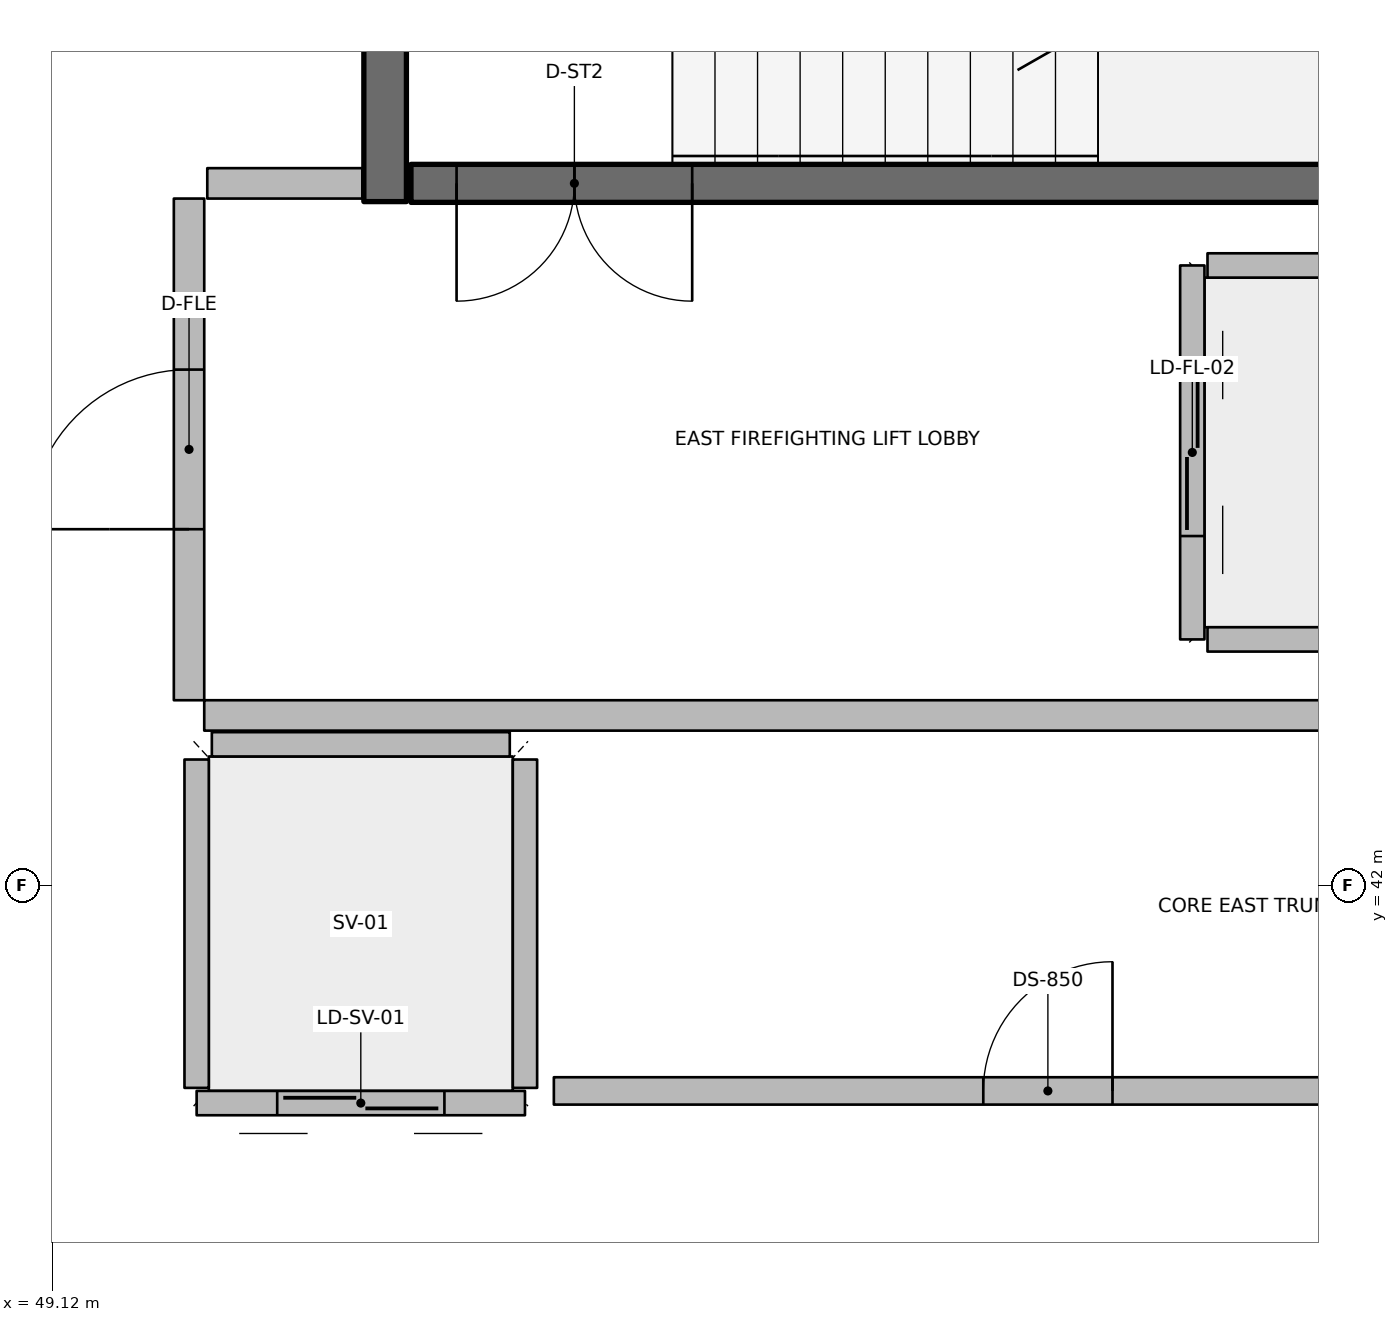
"""IFC4 building model, lengths in metres.
Left out: names, types, materials, properties, quantities, classifications, styles, units other than length and angle.
Written with IfcOpenShell. Run it as: python <this file> out.ifc"""

import sys

from ifc_helpers import new_model, si_unit, direction, frame, frame_2d, origin, origin_2d, place, context, subcontext, project, spatial, rectangle, hollow_rectangle, extrude, element, fill, save


model = new_model("IFC4")
c1 = context("Model", 3, precision=1e-05, world=origin(), true_north=direction((0.0, 1.0)))
c2 = subcontext(c1, "Body", "Model", "MODEL_VIEW")
j1 = project(units=[si_unit("LENGTHUNIT", "METRE"), si_unit("PLANEANGLEUNIT", "RADIAN")], contexts=[c1])
p1 = place(None, origin())
s1 = spatial("IfcSite", under=j1, at=p1, CompositionType="ELEMENT")
p2 = place(p1, origin())
s2 = spatial("IfcBuilding", under=s1, at=p2, CompositionType="ELEMENT")
p3 = place(p2, frame((0.0, 0.0, 26.4)))
s3 = spatial("IfcBuildingStorey", under=s2, at=p3, CompositionType="ELEMENT", Elevation=26.4)
p4 = place(p3, frame((51.31, 46.5, 0.0), z_axis=(0.0, 0.0, 1.0), x_axis=(0.0, 1.0, 0.0)))
e1 = element("IfcWall", 1, at=p4, inside=s3, PredefinedType="SHEAR", context=c2, shape_type="SweptSolid", body=[
    extrude(rectangle(XDim=3.5, YDim=0.28, at=frame_2d((1.75, 0.0))), origin(), (0.0, 0.0, 1.0), 3.75),
])
p5 = place(p3, frame((56.0, 46.62, 0.0), z_axis=(0.0, 0.0, 1.0), x_axis=(1.0, 0.0, 0.0)))
e2 = element("IfcColumn", 2, at=p5, inside=s3, PredefinedType="COLUMN", context=c2, shape_type="SweptSolid", body=[
    extrude(hollow_rectangle(XDim=0.2, YDim=0.2, WallThickness=0.01, InnerFilletRadius=0.01, OuterFilletRadius=0.02, at=origin_2d()), origin(), (0.0, 0.0, 1.0), 1.67),
])
p6 = place(p3, frame((51.48, 46.62, 0.0), z_axis=(0.0, 0.0, 1.0), x_axis=(1.0, 0.0, 0.0)))
e3 = element("IfcWall", 3, at=p6, inside=s3, PredefinedType="SOLIDWALL", context=c2, shape_type="SweptSolid", body=[
    extrude(rectangle(XDim=7.54, YDim=0.25, at=frame_2d((3.77, 0.0))), origin(), (0.0, 0.0, 1.0), 3.5),
])
p7 = place(p6, frame((0.3, 0.0, 0.0)))
e4 = element("IfcOpeningElement", 4, at=p7, cuts=e3, PredefinedType="OPENING", context=c2, shape_type="SweptSolid", body=[
    extrude(rectangle(XDim=1.55, YDim=2.15, at=frame_2d((0.775, 1.075))), frame((0.0, 0.135, 0.0), z_axis=(0.0, -1.0, 0.0), x_axis=(1.0, 0.0, 0.0)), (0.0, 0.0, 1.0), 0.27),
])
p8 = place(p3, frame((56.62, 46.08, 0.0), z_axis=(0.0, 0.0, 1.0), x_axis=(0.0, -1.0, 0.0)))
e5 = element("IfcWall", 5, at=p8, inside=s3, PredefinedType="PARTITIONING", context=c2, shape_type="SweptSolid", body=[
    extrude(rectangle(XDim=2.46, YDim=0.16, at=frame_2d((1.23, 0.0))), origin(), (0.0, 0.0, 1.0), 3.5),
])
p9 = place(p8, frame((0.68, 0.0, 0.0)))
e6 = element("IfcOpeningElement", 6, at=p9, cuts=e5, PredefinedType="OPENING", context=c2, shape_type="SweptSolid", body=[
    extrude(rectangle(XDim=1.1, YDim=2.1, at=frame_2d((0.55, 1.05))), frame((0.0, 0.09, 0.0), z_axis=(0.0, -1.0, 0.0), x_axis=(1.0, 0.0, 0.0)), (0.0, 0.0, 1.0), 0.18),
])
for number, where, z_axis, x_axis in (
    (7, (56.72, 46.08, 0.0), (0.0, 0.0, 1.0), (1.0, 0.0, 0.0)),
    (8, (56.72, 43.62, 0.0), (0.0, 0.0, 1.0), (1.0, 0.0, 0.0)),
):
    element("IfcWall", number, at=place(p3, frame(where, z_axis=z_axis, x_axis=x_axis)), inside=s3, PredefinedType="PARTITIONING", context=c2, shape_type="SweptSolid", body=[
        extrude(rectangle(XDim=2.06, YDim=0.16, at=frame_2d((1.03, 0.0))), origin(), (0.0, 0.0, 1.0), 3.5),
    ])
p10 = place(p3, frame((52.23, 40.57, 0.0), z_axis=(0.0, 0.0, 1.0), x_axis=(-1.0, 0.0, 0.0)))
e9 = element("IfcWall", 9, at=p10, inside=s3, PredefinedType="PARTITIONING", context=c2, shape_type="SweptSolid", body=[
    extrude(rectangle(XDim=2.16, YDim=0.16, at=frame_2d((1.08, 0.0))), origin(), (0.0, 0.0, 1.0), 3.5),
])
p11 = place(p10, frame((0.53, 0.0, 0.0)))
e10 = element("IfcOpeningElement", 10, at=p11, cuts=e9, PredefinedType="OPENING", context=c2, shape_type="SweptSolid", body=[
    extrude(rectangle(XDim=1.1, YDim=2.1, at=frame_2d((0.55, 1.05))), frame((0.0, 0.09, 0.0), z_axis=(0.0, -1.0, 0.0), x_axis=(1.0, 0.0, 0.0)), (0.0, 0.0, 1.0), 0.18),
])
for number, where, z_axis, x_axis in (
    (11, (52.23, 40.67, 0.0), (0.0, 0.0, 1.0), (0.0, 1.0, 0.0)),
    (12, (50.07, 40.67, 0.0), (0.0, 0.0, 1.0), (0.0, 1.0, 0.0)),
):
    element("IfcWall", number, at=place(p3, frame(where, z_axis=z_axis, x_axis=x_axis)), inside=s3, PredefinedType="PARTITIONING", context=c2, shape_type="SweptSolid", body=[
        extrude(rectangle(XDim=2.16, YDim=0.16, at=frame_2d((1.08, 0.0))), origin(), (0.0, 0.0, 1.0), 3.5),
    ])
p12 = place(p3, frame((50.17, 42.93, 0.0), z_axis=(0.0, 0.0, 1.0), x_axis=(1.0, 0.0, 0.0)))
e13 = element("IfcWall", 13, at=p12, inside=s3, PredefinedType="PARTITIONING", context=c2, shape_type="SweptSolid", body=[
    extrude(rectangle(XDim=1.96, YDim=0.16, at=frame_2d((0.98, 0.0))), origin(), (0.0, 0.0, 1.0), 3.5),
])
p13 = place(p3, frame((52.42, 40.65, 0.0), z_axis=(0.0, 0.0, 1.0), x_axis=(1.0, 0.0, 0.0)))
e14 = element("IfcWall", 14, at=p13, inside=s3, PredefinedType="PARTITIONING", context=c2, shape_type="SweptSolid", body=[
    extrude(rectangle(XDim=6.5, YDim=0.18, at=frame_2d((3.25, 0.0))), origin(), (0.0, 0.0, 1.0), 3.5),
])
p14 = place(p13, frame((2.825, 0.0, 0.0)))
e15 = element("IfcOpeningElement", 15, at=p14, cuts=e14, PredefinedType="OPENING", context=c2, shape_type="SweptSolid", body=[
    extrude(rectangle(XDim=0.85, YDim=2.06, at=frame_2d((0.425, 1.03))), frame((0.0, 0.1, 0.0), z_axis=(0.0, -1.0, 0.0), x_axis=(1.0, 0.0, 0.0)), (0.0, 0.0, 1.0), 0.2),
])
p15 = place(p3, frame((50.12, 43.12, 0.0), z_axis=(0.0, 0.0, 1.0), x_axis=(1.0, 0.0, 0.0)))
e16 = element("IfcWall", 16, at=p15, inside=s3, PredefinedType="PARTITIONING", context=c2, shape_type="SweptSolid", body=[
    extrude(rectangle(XDim=8.88, YDim=0.2, at=frame_2d((4.44, 0.0))), origin(), (0.0, 0.0, 1.0), 3.5),
])
p16 = place(p3, frame((50.14, 46.62, 0.0), z_axis=(0.0, 0.0, 1.0), x_axis=(1.0, 0.0, 0.0)))
e17 = element("IfcWall", 17, at=p16, inside=s3, PredefinedType="PARTITIONING", context=c2, shape_type="SweptSolid", body=[
    extrude(rectangle(XDim=1.02, YDim=0.2, at=frame_2d((0.51, 0.0))), origin(), (0.0, 0.0, 1.0), 3.5),
])
p17 = place(p3, frame((50.02, 43.22, 0.0), z_axis=(0.0, 0.0, 1.0), x_axis=(0.0, 1.0, 0.0)))
e18 = element("IfcWall", 18, at=p17, inside=s3, PredefinedType="PARTITIONING", context=c2, shape_type="SweptSolid", body=[
    extrude(rectangle(XDim=3.3, YDim=0.2, at=frame_2d((1.65, 0.0))), origin(), (0.0, 0.0, 1.0), 3.5),
])
p18 = place(p17, frame((1.125, 0.0, 0.0)))
e19 = element("IfcOpeningElement", 19, at=p18, cuts=e18, PredefinedType="OPENING", context=c2, shape_type="SweptSolid", body=[
    extrude(rectangle(XDim=1.05, YDim=2.1, at=frame_2d((0.525, 1.05))), frame((0.0, 0.11, 0.0), z_axis=(0.0, -1.0, 0.0), x_axis=(1.0, 0.0, 0.0)), (0.0, 0.0, 1.0), 0.22),
])
p19 = place(p7, origin())
e20 = element("IfcDoor", 20, at=p19, inside=s3, OperationType="DOUBLE_DOOR_SINGLE_SWING", PredefinedType="DOOR", context=c2, shape_type="SweptSolid", body=[
    extrude(rectangle(XDim=1.55, YDim=2.15, at=frame_2d((0.775, 1.075))), frame((0.0, 0.025, 0.0), z_axis=(0.0, -1.0, 0.0), x_axis=(1.0, 0.0, 0.0)), (0.0, 0.0, 1.0), 0.05),
])
fill(e4, e20)
p20 = place(p9, origin())
e21 = element("IfcDoor", 21, at=p20, inside=s3, OperationType="DOUBLE_DOOR_SLIDING", PredefinedType="DOOR", context=c2, shape_type="SweptSolid", body=[
    extrude(rectangle(XDim=1.1, YDim=2.1, at=frame_2d((0.55, 1.05))), frame((0.0, 0.025, 0.0), z_axis=(0.0, -1.0, 0.0), x_axis=(1.0, 0.0, 0.0)), (0.0, 0.0, 1.0), 0.05),
])
fill(e6, e21)
p21 = place(p11, origin())
e22 = element("IfcDoor", 22, at=p21, inside=s3, OperationType="DOUBLE_DOOR_SLIDING", PredefinedType="DOOR", context=c2, shape_type="SweptSolid", body=[
    extrude(rectangle(XDim=1.1, YDim=2.1, at=frame_2d((0.55, 1.05))), frame((0.0, 0.025, 0.0), z_axis=(0.0, -1.0, 0.0), x_axis=(1.0, 0.0, 0.0)), (0.0, 0.0, 1.0), 0.05),
])
fill(e10, e22)
p22 = place(p14, origin())
e23 = element("IfcDoor", 23, at=p22, inside=s3, OperationType="SINGLE_SWING_RIGHT", PredefinedType="DOOR", context=c2, shape_type="SweptSolid", body=[
    extrude(rectangle(XDim=0.85, YDim=2.06, at=frame_2d((0.425, 1.03))), frame((0.0, 0.025, 0.0), z_axis=(0.0, -1.0, 0.0), x_axis=(1.0, 0.0, 0.0)), (0.0, 0.0, 1.0), 0.05),
])
fill(e15, e23)
p23 = place(p18, origin())
e24 = element("IfcDoor", 24, at=p23, inside=s3, OperationType="SINGLE_SWING_LEFT", PredefinedType="DOOR", context=c2, shape_type="SweptSolid", body=[
    extrude(rectangle(XDim=1.05, YDim=2.1, at=frame_2d((0.525, 1.05))), frame((0.0, 0.025, 0.0), z_axis=(0.0, -1.0, 0.0), x_axis=(1.0, 0.0, 0.0)), (0.0, 0.0, 1.0), 0.05),
])
fill(e19, e24)
save(model, sys.argv[1])
